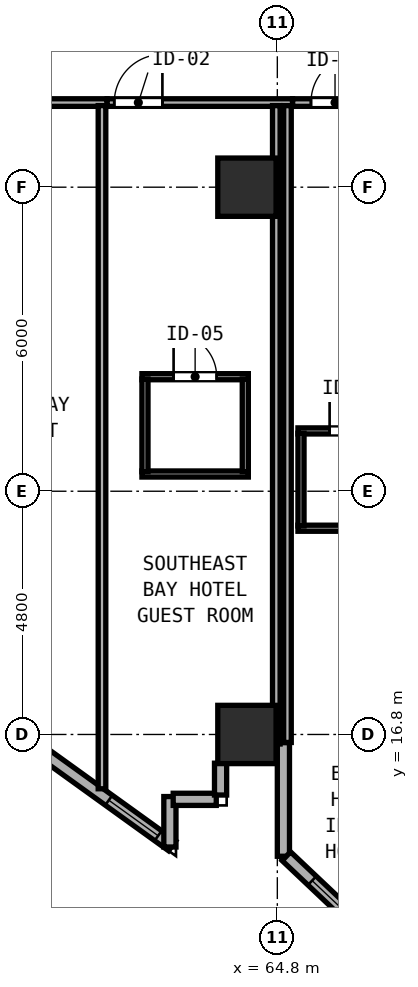
"""IFC4 building model, lengths in metres.
Left out: names, types, materials, properties, quantities, classifications, styles, units other than length and angle.
Written with IfcOpenShell. Run it as: python <this file> out.ifc"""

import sys

from ifc_helpers import new_model, si_unit, direction, frame, frame_2d, origin, origin_2d, place, context, subcontext, project, spatial, rectangle, hollow_rectangle, extrude, element, fill, save


model = new_model("IFC4")
c1 = context("Model", 3, precision=1e-05, world=origin(), true_north=direction((0.0, 1.0)))
c2 = subcontext(c1, "Body", "Model", "MODEL_VIEW")
j1 = project(units=[si_unit("LENGTHUNIT", "METRE"), si_unit("PLANEANGLEUNIT", "RADIAN")], contexts=[c1])
p1 = place(None, origin())
s1 = spatial("IfcSite", under=j1, at=p1, CompositionType="ELEMENT")
p2 = place(p1, origin())
s2 = spatial("IfcBuilding", under=s1, at=p2, CompositionType="ELEMENT")
p3 = place(p2, frame((0.0, 0.0, 59.0)))
s3 = spatial("IfcBuildingStorey", under=s2, at=p3, CompositionType="ELEMENT", Elevation=59.0)
for number, where, z_axis, x_axis in (
    (1, (64.2, 16.8, 0.0), (0.0, 0.0, 1.0), (1.0, 0.0, 0.0)),
    (2, (64.2, 27.6, 0.0), (0.0, 0.0, 1.0), (1.0, 0.0, 0.0)),
):
    element("IfcColumn", number, at=place(p3, frame(where, z_axis=z_axis, x_axis=x_axis)), inside=s3, PredefinedType="COLUMN", context=c2, shape_type="SweptSolid", body=[
        extrude(hollow_rectangle(XDim=1.15, YDim=1.15, WallThickness=0.042, at=origin_2d()), origin(), (0.0, 0.0, 1.0), 3.8),
    ])
p4 = place(p3, frame((53.367, 21.34, 0.0), z_axis=(0.0, 0.0, 1.0), x_axis=(0.811543176492, -0.58429245476, 0.0)))
e3 = element("IfcWall", 3, at=p4, inside=s3, PredefinedType="SOLIDWALL", context=c2, shape_type="SweptSolid", body=[
    extrude(rectangle(XDim=11.531, YDim=0.24, at=frame_2d((5.765, 0.0))), origin(), (0.0, 0.0, 1.0), 3.097),
])
p5 = place(p4, frame((0.7, 0.0, 0.85)))
e4 = element("IfcOpeningElement", 4, at=p5, cuts=e3, PredefinedType="OPENING", context=c2, shape_type="SweptSolid", body=[
    extrude(rectangle(XDim=1.2, YDim=1.85, at=frame_2d((0.6, 0.925))), frame((0.0, 0.13, 0.0), z_axis=(0.0, -1.0, 0.0), x_axis=(1.0, 0.0, 0.0)), (0.0, 0.0, 1.0), 0.26),
])
p6 = place(p4, frame((6.1, 0.0, 0.85)))
e5 = element("IfcOpeningElement", 5, at=p6, cuts=e3, PredefinedType="OPENING", context=c2, shape_type="SweptSolid", body=[
    extrude(rectangle(XDim=1.2, YDim=1.85, at=frame_2d((0.6, 0.925))), frame((0.0, 0.13, 0.0), z_axis=(0.0, -1.0, 0.0), x_axis=(1.0, 0.0, 0.0)), (0.0, 0.0, 1.0), 0.26),
])
p7 = place(p4, frame((9.99, 0.0, 0.85)))
e6 = element("IfcOpeningElement", 6, at=p7, cuts=e3, PredefinedType="OPENING", context=c2, shape_type="SweptSolid", body=[
    extrude(rectangle(XDim=1.2, YDim=1.85, at=frame_2d((0.6, 0.925))), frame((0.0, 0.13, 0.0), z_axis=(0.0, -1.0, 0.0), x_axis=(1.0, 0.0, 0.0)), (0.0, 0.0, 1.0), 0.26),
])
p8 = place(p3, frame((62.68, 14.579, 0.0), z_axis=(0.0, 0.0, 1.0), x_axis=(0.0, 1.0, 0.0)))
e7 = element("IfcWall", 7, at=p8, inside=s3, PredefinedType="SOLIDWALL", context=c2, shape_type="SweptSolid", body=[
    extrude(rectangle(XDim=0.996, YDim=0.24, at=frame_2d((0.498, 0.0))), origin(), (0.0, 0.0, 1.0), 3.6),
])
p9 = place(p3, frame((62.745, 15.52, 0.0), z_axis=(0.0, 0.0, 1.0), x_axis=(1.0, 0.0, 0.0)))
e8 = element("IfcWall", 8, at=p9, inside=s3, PredefinedType="SOLIDWALL", context=c2, shape_type="SweptSolid", body=[
    extrude(rectangle(XDim=0.85, YDim=0.24, at=frame_2d((0.425, 0.0))), origin(), (0.0, 0.0, 1.0), 3.6),
])
p10 = place(p3, frame((63.68, 15.605, 0.0), z_axis=(0.0, 0.0, 1.0), x_axis=(0.0, 1.0, 0.0)))
e9 = element("IfcWall", 9, at=p10, inside=s3, PredefinedType="SOLIDWALL", context=c2, shape_type="SweptSolid", body=[
    extrude(rectangle(XDim=0.628, YDim=0.24, at=frame_2d((0.314, 0.0))), origin(), (0.0, 0.0, 1.0), 3.6),
])
p11 = place(p3, frame((64.92, 16.64, 0.0), z_axis=(0.0, 0.0, 1.0), x_axis=(0.0, -1.0, 0.0)))
e10 = element("IfcWall", 10, at=p11, inside=s3, PredefinedType="SOLIDWALL", context=c2, shape_type="SweptSolid", body=[
    extrude(rectangle(XDim=2.243, YDim=0.24, at=frame_2d((1.122, 0.0))), origin(), (0.0, 0.0, 1.0), 3.6),
])
p12 = place(p3, frame((64.978, 14.397, 0.0), z_axis=(0.0, 0.0, 1.0), x_axis=(0.726654877609, -0.687002684745, 0.0)))
e11 = element("IfcWall", 11, at=p12, inside=s3, PredefinedType="SOLIDWALL", context=c2, shape_type="SweptSolid", body=[
    extrude(rectangle(XDim=11.588, YDim=0.24, at=frame_2d((5.794, 0.0))), origin(), (0.0, 0.0, 1.0), 3.6),
])
p13 = place(p12, frame((0.7, 0.0, 0.85)))
e12 = element("IfcOpeningElement", 12, at=p13, cuts=e11, PredefinedType="OPENING", context=c2, shape_type="SweptSolid", body=[
    extrude(rectangle(XDim=1.2, YDim=1.85, at=frame_2d((0.6, 0.925))), frame((0.0, 0.13, 0.0), z_axis=(0.0, -1.0, 0.0), x_axis=(1.0, 0.0, 0.0)), (0.0, 0.0, 1.0), 0.26),
])
p14 = place(p12, frame((6.1, 0.0, 0.85)))
e13 = element("IfcOpeningElement", 13, at=p14, cuts=e11, PredefinedType="OPENING", context=c2, shape_type="SweptSolid", body=[
    extrude(rectangle(XDim=1.2, YDim=1.85, at=frame_2d((0.6, 0.925))), frame((0.0, 0.13, 0.0), z_axis=(0.0, -1.0, 0.0), x_axis=(1.0, 0.0, 0.0)), (0.0, 0.0, 1.0), 0.26),
])
p15 = place(p3, frame((57.172, 29.27, 0.0), z_axis=(0.0, 0.0, 1.0), x_axis=(1.0, 0.0, 0.0)))
e14 = element("IfcWall", 14, at=p15, inside=s3, PredefinedType="PARTITIONING", context=c2, shape_type="SweptSolid", body=[
    extrude(rectangle(XDim=4.268, YDim=0.15, at=frame_2d((2.134, 0.0))), origin(), (0.0, 0.0, 1.0), 3.6),
])
p16 = place(p15, frame((2.959, 0.0, 0.0), z_axis=(0.0, 0.0, 1.0), x_axis=(-1.0, 0.0, 0.0)))
e15 = element("IfcOpeningElement", 15, at=p16, cuts=e14, PredefinedType="OPENING", context=c2, shape_type="SweptSolid", body=[
    extrude(rectangle(XDim=0.95, YDim=2.15, at=frame_2d((0.475, 1.075))), frame((0.0, 0.085, 0.0), z_axis=(0.0, -1.0, 0.0), x_axis=(1.0, 0.0, 0.0)), (0.0, 0.0, 1.0), 0.17),
])
p17 = place(p3, frame((61.34, 15.729, 0.0), z_axis=(0.0, 0.0, 1.0), x_axis=(0.0, 1.0, 0.0)))
e16 = element("IfcWall", 16, at=p17, inside=s3, PredefinedType="PARTITIONING", context=c2, shape_type="SweptSolid", body=[
    extrude(rectangle(XDim=13.481, YDim=0.15, at=frame_2d((6.741, 0.0))), origin(), (0.0, 0.0, 1.0), 3.6),
])
p18 = place(p3, frame((61.442, 29.27, 0.0), z_axis=(0.0, 0.0, 1.0), x_axis=(1.0, 0.0, 0.0)))
e17 = element("IfcWall", 17, at=p18, inside=s3, PredefinedType="PARTITIONING", context=c2, shape_type="SweptSolid", body=[
    extrude(rectangle(XDim=3.658, YDim=0.15, at=frame_2d((1.829, 0.0))), origin(), (0.0, 0.0, 1.0), 3.6),
])
p19 = place(p18, frame((1.09, 0.0, 0.0), z_axis=(0.0, 0.0, 1.0), x_axis=(-1.0, 0.0, 0.0)))
e18 = element("IfcOpeningElement", 18, at=p19, cuts=e17, PredefinedType="OPENING", context=c2, shape_type="SweptSolid", body=[
    extrude(rectangle(XDim=0.95, YDim=2.15, at=frame_2d((0.475, 1.075))), frame((0.0, 0.085, 0.0), z_axis=(0.0, -1.0, 0.0), x_axis=(1.0, 0.0, 0.0)), (0.0, 0.0, 1.0), 0.17),
])
p20 = place(p3, frame((65.0, 16.642, 0.0), z_axis=(0.0, 0.0, 1.0), x_axis=(0.0, 1.0, 0.0)))
e19 = element("IfcWall", 19, at=p20, inside=s3, PredefinedType="PARTITIONING", context=c2, shape_type="SweptSolid", body=[
    extrude(rectangle(XDim=12.568, YDim=0.15, at=frame_2d((6.284, 0.0))), origin(), (0.0, 0.0, 1.0), 3.6),
])
p21 = place(p3, frame((62.128, 23.86, 0.0), z_axis=(0.0, 0.0, 1.0), x_axis=(1.0, 0.0, 0.0)))
e20 = element("IfcWall", 20, at=p21, inside=s3, PredefinedType="PARTITIONING", context=c2, shape_type="SweptSolid", body=[
    extrude(rectangle(XDim=2.1, YDim=0.12, at=frame_2d((1.05, 0.0))), origin(), (0.0, 0.0, 1.0), 3.6),
])
p22 = place(p21, frame((1.475, 0.0, 0.0), z_axis=(0.0, 0.0, 1.0), x_axis=(-1.0, 0.0, 0.0)))
e21 = element("IfcOpeningElement", 21, at=p22, cuts=e20, PredefinedType="OPENING", context=c2, shape_type="SweptSolid", body=[
    extrude(rectangle(XDim=0.85, YDim=2.1, at=frame_2d((0.425, 1.05))), frame((0.0, 0.07, 0.0), z_axis=(0.0, -1.0, 0.0), x_axis=(1.0, 0.0, 0.0)), (0.0, 0.0, 1.0), 0.14),
])
p23 = place(p3, frame((62.128, 21.94, 0.0), z_axis=(0.0, 0.0, 1.0), x_axis=(1.0, 0.0, 0.0)))
e22 = element("IfcWall", 22, at=p23, inside=s3, PredefinedType="PARTITIONING", context=c2, shape_type="SweptSolid", body=[
    extrude(rectangle(XDim=2.1, YDim=0.12, at=frame_2d((1.05, 0.0))), origin(), (0.0, 0.0, 1.0), 3.6),
])
p24 = place(p3, frame((62.188, 21.985, 0.0), z_axis=(0.0, 0.0, 1.0), x_axis=(0.0, 1.0, 0.0)))
e23 = element("IfcWall", 23, at=p24, inside=s3, PredefinedType="PARTITIONING", context=c2, shape_type="SweptSolid", body=[
    extrude(rectangle(XDim=1.83, YDim=0.12, at=frame_2d((0.915, 0.0))), origin(), (0.0, 0.0, 1.0), 3.6),
])
p25 = place(p3, frame((64.168, 21.985, 0.0), z_axis=(0.0, 0.0, 1.0), x_axis=(0.0, 1.0, 0.0)))
e24 = element("IfcWall", 24, at=p25, inside=s3, PredefinedType="PARTITIONING", context=c2, shape_type="SweptSolid", body=[
    extrude(rectangle(XDim=1.83, YDim=0.12, at=frame_2d((0.915, 0.0))), origin(), (0.0, 0.0, 1.0), 3.097),
])
p26 = place(p3, frame((65.102, 29.27, 0.0), z_axis=(0.0, 0.0, 1.0), x_axis=(1.0, 0.0, 0.0)))
e25 = element("IfcWall", 25, at=p26, inside=s3, PredefinedType="PARTITIONING", context=c2, shape_type="SweptSolid", body=[
    extrude(rectangle(XDim=2.498, YDim=0.15, at=frame_2d((1.249, 0.0))), origin(), (0.0, 0.0, 1.0), 3.6),
])
p27 = place(p26, frame((1.312, 0.0, 0.0), z_axis=(0.0, 0.0, 1.0), x_axis=(-1.0, 0.0, 0.0)))
e26 = element("IfcOpeningElement", 26, at=p27, cuts=e25, PredefinedType="OPENING", context=c2, shape_type="SweptSolid", body=[
    extrude(rectangle(XDim=0.95, YDim=2.15, at=frame_2d((0.475, 1.075))), frame((0.0, 0.085, 0.0), z_axis=(0.0, -1.0, 0.0), x_axis=(1.0, 0.0, 0.0)), (0.0, 0.0, 1.0), 0.17),
])
p28 = place(p3, frame((64.78, 16.612, 0.0), z_axis=(0.0, 0.0, 1.0), x_axis=(0.0, 1.0, 0.0)))
e27 = element("IfcWall", 27, at=p28, inside=s3, PredefinedType="PARTITIONING", context=c2, shape_type="SweptSolid", body=[
    extrude(rectangle(XDim=12.598, YDim=0.15, at=frame_2d((6.299, 0.0))), origin(), (0.0, 0.0, 1.0), 3.6),
])
p29 = place(p3, frame((65.207, 22.79, 0.0), z_axis=(0.0, 0.0, 1.0), x_axis=(1.0, 0.0, 0.0)))
e28 = element("IfcWall", 28, at=p29, inside=s3, PredefinedType="PARTITIONING", context=c2, shape_type="SweptSolid", body=[
    extrude(rectangle(XDim=2.1, YDim=0.12, at=frame_2d((1.05, 0.0))), origin(), (0.0, 0.0, 1.0), 3.6),
])
p30 = place(p29, frame((1.475, 0.0, 0.0), z_axis=(0.0, 0.0, 1.0), x_axis=(-1.0, 0.0, 0.0)))
e29 = element("IfcOpeningElement", 29, at=p30, cuts=e28, PredefinedType="OPENING", context=c2, shape_type="SweptSolid", body=[
    extrude(rectangle(XDim=0.85, YDim=2.1, at=frame_2d((0.425, 1.05))), frame((0.0, 0.07, 0.0), z_axis=(0.0, -1.0, 0.0), x_axis=(1.0, 0.0, 0.0)), (0.0, 0.0, 1.0), 0.14),
])
p31 = place(p3, frame((65.207, 20.87, 0.0), z_axis=(0.0, 0.0, 1.0), x_axis=(1.0, 0.0, 0.0)))
e30 = element("IfcWall", 30, at=p31, inside=s3, PredefinedType="PARTITIONING", context=c2, shape_type="SweptSolid", body=[
    extrude(rectangle(XDim=2.1, YDim=0.12, at=frame_2d((1.05, 0.0))), origin(), (0.0, 0.0, 1.0), 3.6),
])
p32 = place(p3, frame((65.267, 20.915, 0.0), z_axis=(0.0, 0.0, 1.0), x_axis=(0.0, 1.0, 0.0)))
e31 = element("IfcWall", 31, at=p32, inside=s3, PredefinedType="PARTITIONING", context=c2, shape_type="SweptSolid", body=[
    extrude(rectangle(XDim=1.83, YDim=0.12, at=frame_2d((0.915, 0.0))), origin(), (0.0, 0.0, 1.0), 3.6),
])
p33 = place(p13, origin())
e32 = element("IfcWindow", 32, at=p33, inside=s3, PartitioningType="SINGLE_PANEL", PredefinedType="WINDOW", context=c2, shape_type="SweptSolid", body=[
    extrude(rectangle(XDim=1.2, YDim=1.85, at=frame_2d((0.6, 0.925))), frame((0.0, 0.03, 0.0), z_axis=(0.0, -1.0, 0.0), x_axis=(1.0, 0.0, 0.0)), (0.0, 0.0, 1.0), 0.06),
])
fill(e12, e32)
p34 = place(p19, origin())
e33 = element("IfcDoor", 33, at=p34, inside=s3, OperationType="SINGLE_SWING_LEFT", PredefinedType="DOOR", context=c2, shape_type="SweptSolid", body=[
    extrude(rectangle(XDim=0.95, YDim=2.15, at=frame_2d((0.475, 1.075))), frame((0.0, 0.025, 0.0), z_axis=(0.0, -1.0, 0.0), x_axis=(1.0, 0.0, 0.0)), (0.0, 0.0, 1.0), 0.05),
])
fill(e18, e33)
p35 = place(p22, origin())
e34 = element("IfcDoor", 34, at=p35, inside=s3, OperationType="SINGLE_SWING_RIGHT", PredefinedType="DOOR", context=c2, shape_type="SweptSolid", body=[
    extrude(rectangle(XDim=0.85, YDim=2.1, at=frame_2d((0.425, 1.05))), frame((0.0, 0.025, 0.0), z_axis=(0.0, -1.0, 0.0), x_axis=(1.0, 0.0, 0.0)), (0.0, 0.0, 1.0), 0.05),
])
fill(e21, e34)
p36 = place(p27, origin())
e35 = element("IfcDoor", 35, at=p36, inside=s3, OperationType="SINGLE_SWING_LEFT", PredefinedType="DOOR", context=c2, shape_type="SweptSolid", body=[
    extrude(rectangle(XDim=0.95, YDim=2.15, at=frame_2d((0.475, 1.075))), frame((0.0, 0.025, 0.0), z_axis=(0.0, -1.0, 0.0), x_axis=(1.0, 0.0, 0.0)), (0.0, 0.0, 1.0), 0.05),
])
fill(e26, e35)
p37 = place(p30, origin())
e36 = element("IfcDoor", 36, at=p37, inside=s3, OperationType="SINGLE_SWING_RIGHT", PredefinedType="DOOR", context=c2, shape_type="SweptSolid", body=[
    extrude(rectangle(XDim=0.85, YDim=2.1, at=frame_2d((0.425, 1.05))), frame((0.0, 0.025, 0.0), z_axis=(0.0, -1.0, 0.0), x_axis=(1.0, 0.0, 0.0)), (0.0, 0.0, 1.0), 0.05),
])
fill(e29, e36)
p38 = place(p7, origin())
e37 = element("IfcWindow", 37, at=p38, inside=s3, PartitioningType="SINGLE_PANEL", PredefinedType="WINDOW", context=c2, shape_type="SweptSolid", body=[
    extrude(rectangle(XDim=1.2, YDim=1.85, at=frame_2d((0.6, 0.925))), frame((0.0, 0.03, 0.0), z_axis=(0.0, -1.0, 0.0), x_axis=(1.0, 0.0, 0.0)), (0.0, 0.0, 1.0), 0.06),
])
fill(e6, e37)
save(model, sys.argv[1])
